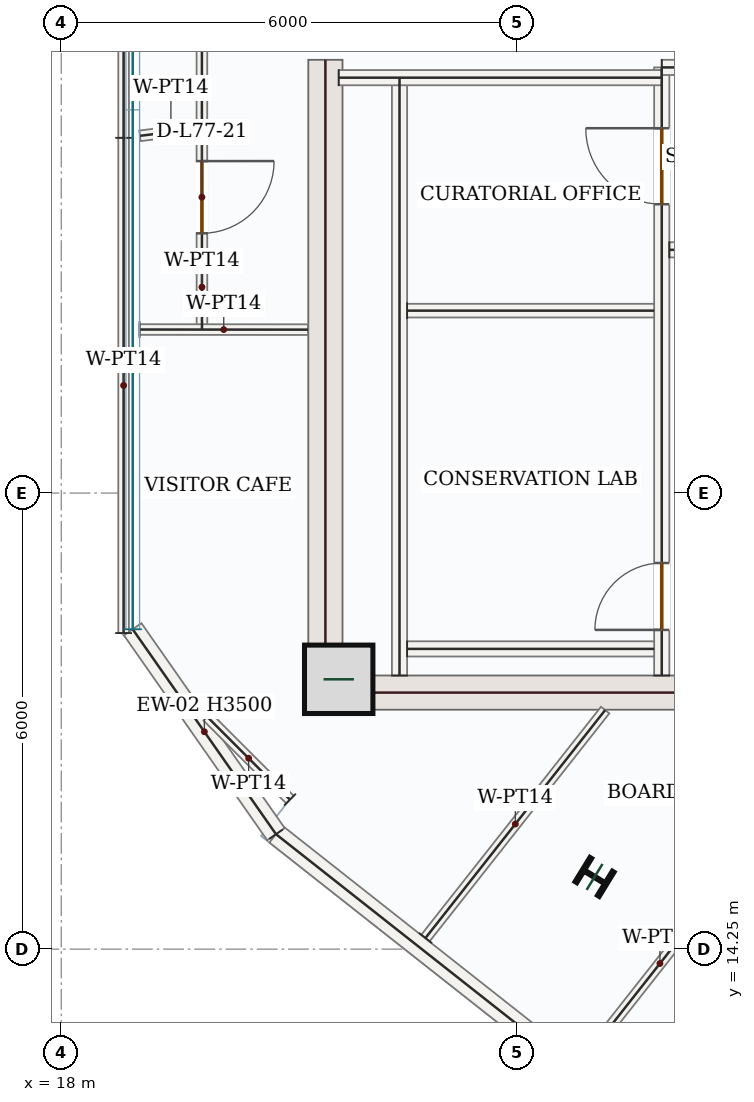
"""IFC4 building model, lengths in metres.
Left out: names, types, materials, properties, quantities, classifications, styles, units other than length and angle.
Written with IfcOpenShell. Run it as: python <this file> out.ifc"""

import sys

from ifc_helpers import new_model, si_unit, direction, frame, frame_2d, origin, origin_2d, place, context, subcontext, project, spatial, rectangle, i_section, extrude, source, transform, mapped, element, fill, save


model = new_model("IFC4")
c1 = context("Model", 3, precision=1e-05, world=origin(), true_north=direction((0.0, 1.0)))
c2 = subcontext(c1, "Body", "Model", "MODEL_VIEW")
j1 = project(units=[si_unit("LENGTHUNIT", "METRE"), si_unit("PLANEANGLEUNIT", "RADIAN")], contexts=[c1])
p1 = place(None, origin())
s1 = spatial("IfcSite", under=j1, at=p1, CompositionType="ELEMENT")
p2 = place(p1, origin())
s2 = spatial("IfcBuilding", under=s1, at=p2, CompositionType="ELEMENT")
p3 = place(p2, frame((0.0, 0.0, 319.8)))
s3 = spatial("IfcBuildingStorey", under=s2, at=p3, CompositionType="ELEMENT", Elevation=319.8)
m1 = source(origin(), c2, "Body", "SweptSolid", [
    extrude(rectangle(XDim=8.55, YDim=0.45, at=frame_2d((4.275, 0.0))), origin(), (0.0, 0.0, 1.0), 3.5),
])
p4 = place(p3, frame((21.475, 17.4, 0.0), z_axis=(0.0, 0.0, 1.0), x_axis=(0.0, 1.0, 0.0)))
e1 = element("IfcWall", 1, at=p4, inside=s3, PredefinedType="SHEAR", context=c2, shape_type="MappedRepresentation", body=[
    mapped(m1, transform((0.0, 0.0, 0.0), x_axis=(1.0, 0.0, 0.0), y_axis=(0.0, 1.0, 0.0), z_axis=(0.0, 0.0, 1.0), scale=1.0)),
])
m2 = source(origin(), c2, "Body", "SweptSolid", [
    extrude(rectangle(XDim=7.1, YDim=0.45, at=frame_2d((3.55, 0.0))), origin(), (0.0, 0.0, 1.0), 3.5),
])
p5 = place(p3, frame((21.7, 17.625, 0.0), z_axis=(0.0, 0.0, 1.0), x_axis=(1.0, 0.0, 0.0)))
e2 = element("IfcWall", 2, at=p5, inside=s3, PredefinedType="SHEAR", context=c2, shape_type="MappedRepresentation", body=[
    mapped(m2, transform((0.0, 0.0, 0.0), x_axis=(1.0, 0.0, 0.0), y_axis=(0.0, 1.0, 0.0), z_axis=(0.0, 0.0, 1.0), scale=1.0)),
])
m3 = source(origin(), c2, "Body", "SweptSolid", [
    extrude(rectangle(XDim=0.9, YDim=0.9, at=origin_2d()), origin(), (0.0, 0.0, 1.0), 3.75),
])
p6 = place(p3, frame((21.65, 17.8, 0.0), z_axis=(0.0, 0.0, 1.0), x_axis=(1.0, 0.0, 0.0)))
e3 = element("IfcColumn", 3, at=p6, inside=s3, PredefinedType="COLUMN", context=c2, shape_type="MappedRepresentation", body=[
    mapped(m3, transform((0.0, 0.0, 0.0), x_axis=(1.0, 0.0, 0.0), y_axis=(0.0, 1.0, 0.0), z_axis=(0.0, 0.0, 1.0), scale=1.0)),
])
m4 = source(origin(), c2, "Body", "SweptSolid", [
    extrude(i_section(OverallWidth=0.374, OverallDepth=0.372, WebThickness=0.016, FlangeThickness=0.026, FilletRadius=0.018, at=origin_2d()), origin(), (0.0, 0.0, 1.0), 3.75),
])
p7 = place(p3, frame((25.016, 15.2, 0.0), z_axis=(0.0, 0.0, 1.0), x_axis=(0.522498564716, 0.852640164354, 0.0)))
e4 = element("IfcColumn", 4, at=p7, inside=s3, PredefinedType="COLUMN", context=c2, shape_type="MappedRepresentation", body=[
    mapped(m4, transform((0.0, 0.0, 0.0), x_axis=(1.0, 0.0, 0.0), y_axis=(0.0, 1.0, 0.0), z_axis=(0.0, 0.0, 1.0), scale=1.0)),
])
m5 = source(origin(), c2, "Body", "SweptSolid", [
    extrude(rectangle(XDim=9.92, YDim=0.28, at=frame_2d((4.96, 0.0))), origin(), (0.0, 0.0, 1.0), 3.5),
])
p8 = place(p3, frame((28.615, 9.621, 0.0), z_axis=(0.0, 0.0, 1.0), x_axis=(-0.785317257435, 0.619093535077, 0.0)))
e5 = element("IfcWall", 5, at=p8, inside=s3, PredefinedType="SOLIDWALL", context=c2, shape_type="MappedRepresentation", body=[
    mapped(m5, transform((0.0, 0.0, 0.0), x_axis=(1.0, 0.0, 0.0), y_axis=(0.0, 1.0, 0.0), z_axis=(0.0, 0.0, 1.0), scale=1.0)),
])
m6 = source(origin(), c2, "Body", "SweptSolid", [
    extrude(rectangle(XDim=3.29, YDim=0.28, at=frame_2d((1.645, 0.0))), origin(), (0.0, 0.0, 1.0), 3.5),
])
p9 = place(p3, frame((20.825, 15.762, 0.0), z_axis=(0.0, 0.0, 1.0), x_axis=(-0.573043854491, 0.819524704222, 0.0)))
e6 = element("IfcWall", 6, at=p9, inside=s3, PredefinedType="SOLIDWALL", context=c2, shape_type="MappedRepresentation", body=[
    mapped(m6, transform((0.0, 0.0, 0.0), x_axis=(1.0, 0.0, 0.0), y_axis=(0.0, 1.0, 0.0), z_axis=(0.0, 0.0, 1.0), scale=1.0)),
])
m7 = source(origin(), c2, "Body", "SweptSolid", [
    extrude(rectangle(XDim=7.87, YDim=0.2, at=frame_2d((3.935, 0.0))), origin(), (0.0, 0.0, 1.0), 3.5),
])
p10 = place(p3, frame((22.45, 17.85, 0.0), z_axis=(0.0, 0.0, 1.0), x_axis=(0.0, 1.0, 0.0)))
e7 = element("IfcWall", 7, at=p10, inside=s3, PredefinedType="SOLIDWALL", context=c2, shape_type="MappedRepresentation", body=[
    mapped(m7, transform((0.0, 0.0, 0.0), x_axis=(1.0, 0.0, 0.0), y_axis=(0.0, 1.0, 0.0), z_axis=(0.0, 0.0, 1.0), scale=1.0)),
])
p11 = place(p3, frame((25.9, 17.85, 0.0), z_axis=(0.0, 0.0, 1.0), x_axis=(0.0, 1.0, 0.0)))
e8 = element("IfcWall", 8, at=p11, inside=s3, PredefinedType="SOLIDWALL", context=c2, shape_type="SweptSolid", body=[
    extrude(rectangle(XDim=8.0, YDim=0.2, at=frame_2d((4.0, 0.0))), origin(), (0.0, 0.0, 1.0), 3.5),
])
p12 = place(p11, frame((6.2, 0.0, 0.0)))
e9 = element("IfcOpeningElement", 9, at=p12, cuts=e8, PredefinedType="OPENING", context=c2, shape_type="SweptSolid", body=[
    extrude(rectangle(XDim=1.0, YDim=2.15, at=frame_2d((0.5, 1.075))), frame((0.0, 0.11, 0.0), z_axis=(0.0, -1.0, 0.0), x_axis=(1.0, 0.0, 0.0)), (0.0, 0.0, 1.0), 0.22),
])
p13 = place(p11, frame((0.6, 0.0, 0.0)))
e10 = element("IfcOpeningElement", 10, at=p13, cuts=e8, PredefinedType="OPENING", context=c2, shape_type="SweptSolid", body=[
    extrude(rectangle(XDim=0.88, YDim=2.1, at=frame_2d((0.44, 1.05))), frame((0.0, 0.11, 0.0), z_axis=(0.0, -1.0, 0.0), x_axis=(1.0, 0.0, 0.0)), (0.0, 0.0, 1.0), 0.22),
])
m8 = source(origin(), c2, "Body", "SweptSolid", [
    extrude(rectangle(XDim=4.25, YDim=0.2, at=frame_2d((2.125, 0.0))), origin(), (0.0, 0.0, 1.0), 3.5),
])
p14 = place(p3, frame((21.65, 25.715, 0.0), z_axis=(0.0, 0.0, 1.0), x_axis=(1.0, 0.0, 0.0)))
e11 = element("IfcWall", 11, at=p14, inside=s3, PredefinedType="SOLIDWALL", context=c2, shape_type="MappedRepresentation", body=[
    mapped(m8, transform((0.0, 0.0, 0.0), x_axis=(1.0, 0.0, 0.0), y_axis=(0.0, 1.0, 0.0), z_axis=(0.0, 0.0, 1.0), scale=1.0)),
])
m9 = source(origin(), c2, "Body", "SweptSolid", [
    extrude(rectangle(XDim=3.0, YDim=0.2, at=frame_2d((1.5, 0.0))), origin(), (0.0, 0.0, 1.0), 3.5),
])
p15 = place(p3, frame((25.9, 25.85, 0.0), z_axis=(0.0, 0.0, 1.0), x_axis=(1.0, 0.0, 0.0)))
e12 = element("IfcWall", 12, at=p15, inside=s3, PredefinedType="SOLIDWALL", context=c2, shape_type="MappedRepresentation", body=[
    mapped(m9, transform((0.0, 0.0, 0.0), x_axis=(1.0, 0.0, 0.0), y_axis=(0.0, 1.0, 0.0), z_axis=(0.0, 0.0, 1.0), scale=1.0)),
])
m10 = source(origin(), c2, "Body", "SweptSolid", [
    extrude(rectangle(XDim=3.25, YDim=0.2, at=frame_2d((1.625, 0.0))), origin(), (0.0, 0.0, 1.0), 3.5),
])
p16 = place(p3, frame((22.55, 18.2, 0.0), z_axis=(0.0, 0.0, 1.0), x_axis=(1.0, 0.0, 0.0)))
e13 = element("IfcWall", 13, at=p16, inside=s3, PredefinedType="SOLIDWALL", context=c2, shape_type="MappedRepresentation", body=[
    mapped(m10, transform((0.0, 0.0, 0.0), x_axis=(1.0, 0.0, 0.0), y_axis=(0.0, 1.0, 0.0), z_axis=(0.0, 0.0, 1.0), scale=1.0)),
])
m11 = source(origin(), c2, "Body", "SweptSolid", [
    extrude(rectangle(XDim=3.25, YDim=0.18, at=frame_2d((1.625, 0.0))), origin(), (0.0, 0.0, 1.0), 3.5),
])
p17 = place(p3, frame((22.55, 22.65, 0.0), z_axis=(0.0, 0.0, 1.0), x_axis=(1.0, 0.0, 0.0)))
e14 = element("IfcWall", 14, at=p17, inside=s3, PredefinedType="PARTITIONING", context=c2, shape_type="MappedRepresentation", body=[
    mapped(m11, transform((0.0, 0.0, 0.0), x_axis=(1.0, 0.0, 0.0), y_axis=(0.0, 1.0, 0.0), z_axis=(0.0, 0.0, 1.0), scale=1.0)),
])
m12 = source(origin(), c2, "Body", "SweptSolid", [
    extrude(rectangle(XDim=2.75, YDim=0.2, at=frame_2d((1.375, 0.0))), origin(), (0.0, 0.0, 1.0), 3.5),
])
p18 = place(p3, frame((26.0, 23.45, 0.0), z_axis=(0.0, 0.0, 1.0), x_axis=(1.0, 0.0, 0.0)))
e15 = element("IfcWall", 15, at=p18, inside=s3, PredefinedType="SOLIDWALL", context=c2, shape_type="MappedRepresentation", body=[
    mapped(m12, transform((0.0, 0.0, 0.0), x_axis=(1.0, 0.0, 0.0), y_axis=(0.0, 1.0, 0.0), z_axis=(0.0, 0.0, 1.0), scale=1.0)),
])
m13 = source(origin(), c2, "Body", "SweptSolid", [
    extrude(rectangle(XDim=3.818, YDim=0.14, at=frame_2d((1.909, 0.0))), origin(), (0.0, 0.0, 1.0), 3.5),
])
p19 = place(p3, frame((22.792, 14.396, 0.0), z_axis=(0.0, 0.0, 1.0), x_axis=(0.619119655452, 0.78529666511, 0.0)))
e16 = element("IfcWall", 16, at=p19, inside=s3, PredefinedType="PARTITIONING", context=c2, shape_type="MappedRepresentation", body=[
    mapped(m13, transform((0.0, 0.0, 0.0), x_axis=(1.0, 0.0, 0.0), y_axis=(0.0, 1.0, 0.0), z_axis=(0.0, 0.0, 1.0), scale=1.0)),
])
p20 = place(p3, frame((28.177, 16.98, 0.0), z_axis=(0.0, 0.0, 1.0), x_axis=(-0.619105408422, -0.785307897109, 0.0)))
e17 = element("IfcWall", 17, at=p20, inside=s3, PredefinedType="PARTITIONING", context=c2, shape_type="SweptSolid", body=[
    extrude(rectangle(XDim=5.363, YDim=0.14, at=frame_2d((2.682, 0.0))), origin(), (0.0, 0.0, 1.0), 3.5),
])
p21 = place(p20, frame((0.971, 0.0, 0.0)))
e18 = element("IfcOpeningElement", 18, at=p21, cuts=e17, PredefinedType="OPENING", context=c2, shape_type="SweptSolid", body=[
    extrude(rectangle(XDim=0.95, YDim=2.15, at=frame_2d((0.475, 1.075))), frame((0.0, 0.08, 0.0), z_axis=(0.0, -1.0, 0.0), x_axis=(1.0, 0.0, 0.0)), (0.0, 0.0, 1.0), 0.16),
])
p22 = place(p3, frame((19.853, 31.523, 0.0), z_axis=(0.0, 0.0, 1.0), x_axis=(-0.000377187662, -0.999999928865, 0.0)))
e19 = element("IfcWall", 19, at=p22, inside=s3, PredefinedType="PARTITIONING", context=c2, shape_type="SweptSolid", body=[
    extrude(rectangle(XDim=6.473, YDim=0.14, at=frame_2d((3.236, 0.0))), origin(), (0.0, 0.0, 1.0), 3.5),
])
p23 = place(p22, frame((4.308, 0.0, 0.0)))
e20 = element("IfcOpeningElement", 20, at=p23, cuts=e19, PredefinedType="OPENING", context=c2, shape_type="SweptSolid", body=[
    extrude(rectangle(XDim=0.95, YDim=2.15, at=frame_2d((0.475, 1.075))), frame((0.0, 0.08, 0.0), z_axis=(0.0, -1.0, 0.0), x_axis=(1.0, 0.0, 0.0)), (0.0, 0.0, 1.0), 0.16),
])
m14 = source(origin(), c2, "Body", "SweptSolid", [
    extrude(rectangle(XDim=0.821, YDim=0.14, at=frame_2d((0.41, 0.0))), origin(), (0.0, 0.0, 1.0), 3.5),
])
p24 = place(p3, frame((19.85, 25.05, 0.0), z_axis=(0.0, 0.0, 1.0), x_axis=(-0.992500466698, -0.122240842617, 0.0)))
e21 = element("IfcWall", 21, at=p24, inside=s3, PredefinedType="PARTITIONING", context=c2, shape_type="MappedRepresentation", body=[
    mapped(m14, transform((0.0, 0.0, 0.0), x_axis=(1.0, 0.0, 0.0), y_axis=(0.0, 1.0, 0.0), z_axis=(0.0, 0.0, 1.0), scale=1.0)),
])
m15 = source(origin(), c2, "Body", "SweptSolid", [
    extrude(rectangle(XDim=6.968, YDim=0.14, at=frame_2d((3.484, 0.0))), origin(), (0.0, 0.0, 1.0), 3.5),
])
p25 = place(p3, frame((18.82, 24.923, 0.0), z_axis=(0.0, 0.0, 1.0), x_axis=(0.0, 1.0, 0.0)))
e22 = element("IfcWall", 22, at=p25, inside=s3, PredefinedType="PARTITIONING", context=c2, shape_type="MappedRepresentation", body=[
    mapped(m15, transform((0.0, 0.0, 0.0), x_axis=(1.0, 0.0, 0.0), y_axis=(0.0, 1.0, 0.0), z_axis=(0.0, 0.0, 1.0), scale=1.0)),
])
p26 = place(p3, frame((19.85, 24.975, 0.0), z_axis=(0.0, 0.0, 1.0), x_axis=(0.000379434615, -0.999999928015, 0.0)))
e23 = element("IfcWall", 23, at=p26, inside=s3, PredefinedType="PARTITIONING", context=c2, shape_type="SweptSolid", body=[
    extrude(rectangle(XDim=2.574, YDim=0.14, at=frame_2d((1.287, 0.0))), origin(), (0.0, 0.0, 1.0), 3.5),
])
p27 = place(p26, frame((0.357, 0.0, 0.0)))
e24 = element("IfcOpeningElement", 24, at=p27, cuts=e23, PredefinedType="OPENING", context=c2, shape_type="SweptSolid", body=[
    extrude(rectangle(XDim=0.95, YDim=2.15, at=frame_2d((0.475, 1.075))), frame((0.0, 0.08, 0.0), z_axis=(0.0, -1.0, 0.0), x_axis=(1.0, 0.0, 0.0)), (0.0, 0.0, 1.0), 0.16),
])
m16 = source(origin(), c2, "Body", "SweptSolid", [
    extrude(rectangle(XDim=2.215, YDim=0.14, at=frame_2d((1.107, 0.0))), origin(), (0.0, 0.0, 1.0), 3.5),
])
p28 = place(p3, frame((19.03, 22.402, 0.0), z_axis=(0.0, 0.0, 1.0), x_axis=(0.999999702379, -0.000771519665, 0.0)))
e25 = element("IfcWall", 25, at=p28, inside=s3, PredefinedType="PARTITIONING", context=c2, shape_type="MappedRepresentation", body=[
    mapped(m16, transform((0.0, 0.0, 0.0), x_axis=(1.0, 0.0, 0.0), y_axis=(0.0, 1.0, 0.0), z_axis=(0.0, 0.0, 1.0), scale=1.0)),
])
m17 = source(origin(), c2, "Body", "SweptSolid", [
    extrude(rectangle(XDim=1.538, YDim=0.14, at=frame_2d((0.769, 0.0))), origin(), (0.0, 0.0, 1.0), 3.5),
])
p29 = place(p3, frame((21.009, 16.217, 0.0), z_axis=(0.0, 0.0, 1.0), x_axis=(-0.706709909315, 0.707503430434, 0.0)))
e26 = element("IfcWall", 26, at=p29, inside=s3, PredefinedType="PARTITIONING", context=c2, shape_type="MappedRepresentation", body=[
    mapped(m17, transform((0.0, 0.0, 0.0), x_axis=(1.0, 0.0, 0.0), y_axis=(0.0, 1.0, 0.0), z_axis=(0.0, 0.0, 1.0), scale=1.0)),
])
m18 = source(origin(), c2, "Body", "SweptSolid", [
    extrude(rectangle(XDim=6.515, YDim=0.14, at=frame_2d((3.258, 0.0))), origin(), (0.0, 0.0, 1.0), 3.5),
])
p30 = place(p3, frame((18.82, 18.408, 0.0), z_axis=(0.0, 0.0, 1.0), x_axis=(0.0, 1.0, 0.0)))
e27 = element("IfcWall", 27, at=p30, inside=s3, PredefinedType="PARTITIONING", context=c2, shape_type="MappedRepresentation", body=[
    mapped(m18, transform((0.0, 0.0, 0.0), x_axis=(1.0, 0.0, 0.0), y_axis=(0.0, 1.0, 0.0), z_axis=(0.0, 0.0, 1.0), scale=1.0)),
])
m19 = source(origin(), c2, "Body", "SweptSolid", [
    extrude(rectangle(XDim=1.0, YDim=2.15, at=frame_2d((0.5, 1.075))), frame((0.0, 0.025, 0.0), z_axis=(0.0, -1.0, 0.0), x_axis=(1.0, 0.0, 0.0)), (0.0, 0.0, 1.0), 0.05),
])
p31 = place(p12, origin())
e28 = element("IfcDoor", 28, at=p31, inside=s3, OperationType="SINGLE_SWING_RIGHT", PredefinedType="DOOR", context=c2, shape_type="MappedRepresentation", body=[
    mapped(m19, transform((0.0, 0.0, 0.0), x_axis=(1.0, 0.0, 0.0), y_axis=(0.0, 1.0, 0.0), z_axis=(0.0, 0.0, 1.0), scale=1.0)),
])
fill(e9, e28)
m20 = source(origin(), c2, "Body", "SweptSolid", [
    extrude(rectangle(XDim=0.88, YDim=2.1, at=frame_2d((0.44, 1.05))), frame((0.0, 0.025, 0.0), z_axis=(0.0, -1.0, 0.0), x_axis=(1.0, 0.0, 0.0)), (0.0, 0.0, 1.0), 0.05),
])
p32 = place(p13, origin())
e29 = element("IfcDoor", 29, at=p32, inside=s3, OperationType="SINGLE_SWING_LEFT", PredefinedType="DOOR", context=c2, shape_type="MappedRepresentation", body=[
    mapped(m20, transform((0.0, 0.0, 0.0), x_axis=(1.0, 0.0, 0.0), y_axis=(0.0, 1.0, 0.0), z_axis=(0.0, 0.0, 1.0), scale=1.0)),
])
fill(e10, e29)
m21 = source(origin(), c2, "Body", "SweptSolid", [
    extrude(rectangle(XDim=0.95, YDim=2.15, at=frame_2d((0.475, 1.075))), frame((0.0, 0.025, 0.0), z_axis=(0.0, -1.0, 0.0), x_axis=(1.0, 0.0, 0.0)), (0.0, 0.0, 1.0), 0.05),
])
p33 = place(p27, origin())
e30 = element("IfcDoor", 30, at=p33, inside=s3, OperationType="SINGLE_SWING_LEFT", PredefinedType="DOOR", context=c2, shape_type="MappedRepresentation", body=[
    mapped(m21, transform((0.0, 0.0, 0.0), x_axis=(1.0, 0.0, 0.0), y_axis=(0.0, 1.0, 0.0), z_axis=(0.0, 0.0, 1.0), scale=1.0)),
])
fill(e24, e30)
save(model, sys.argv[1])
